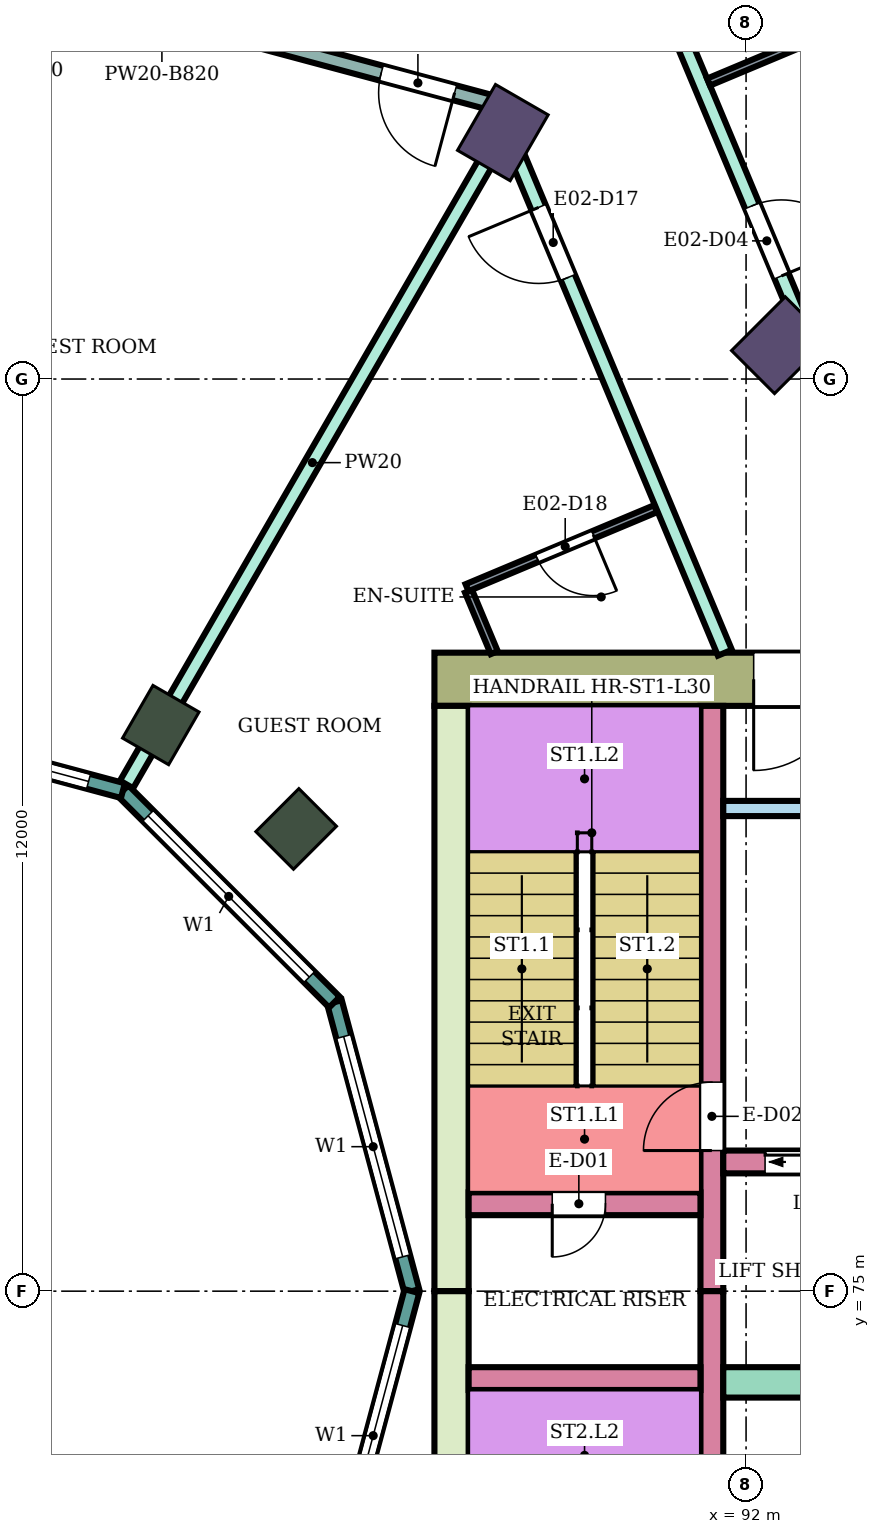
"""IFC4 building model, lengths in metres.
Left out: names, types, materials, properties, quantities, classifications, styles, units other than length and angle.
Written with IfcOpenShell. Run it as: python <this file> out.ifc"""

import sys

from ifc_helpers import new_model, si_unit, direction, frame, frame_2d, origin, origin_2d, place, context, subcontext, project, spatial, rectangle, extrude, element, fill, save


model = new_model("IFC4")
c1 = context("Model", 3, precision=1e-05, world=origin(), true_north=direction((0.0, 1.0)))
c2 = subcontext(c1, "Body", "Model", "MODEL_VIEW")
j1 = project(units=[si_unit("LENGTHUNIT", "METRE"), si_unit("PLANEANGLEUNIT", "RADIAN")], contexts=[c1])
p1 = place(None, origin())
s1 = spatial("IfcSite", under=j1, at=p1, CompositionType="ELEMENT")
p2 = place(p1, origin())
s2 = spatial("IfcBuilding", under=s1, at=p2, CompositionType="ELEMENT")
p3 = place(p2, frame((0.0, 0.0, 130.2)))
s3 = spatial("IfcBuildingStorey", under=s2, at=p3, CompositionType="ELEMENT", Elevation=130.2)
for number, where, z_axis, x_axis in (
    (1, (92.445, 87.445, 0.0), (0.0, 0.0, 1.0), (0.707, 0.707, 0.0)),
    (2, (88.8, 90.242, 0.0), (0.0, 0.0, 1.0), (0.5, 0.866, 0.0)),
):
    element("IfcColumn", number, at=place(p3, frame(where, z_axis=z_axis, x_axis=x_axis)), inside=s3, PredefinedType="COLUMN", context=c2, shape_type="SweptSolid", body=[
        extrude(rectangle(XDim=1.0, YDim=0.8, at=origin_2d()), origin(), (0.0, 0.0, 1.0), 3.9),
    ])
for number, where, z_axis, x_axis in (
    (3, (86.081, 81.081, 0.0), (0.0, 0.0, 1.0), (0.707, 0.707, 0.0)),
    (4, (84.3, 82.448, 0.0), (0.0, 0.0, 1.0), (0.5, 0.866, 0.0)),
):
    element("IfcColumn", number, at=place(p3, frame(where, z_axis=z_axis, x_axis=x_axis)), inside=s3, PredefinedType="COLUMN", context=c2, shape_type="SweptSolid", body=[
        extrude(rectangle(XDim=0.8, YDim=0.7, at=origin_2d()), origin(), (0.0, 0.0, 1.0), 3.9),
    ])
p4 = place(p3, frame((87.9, 83.05, 0.0), z_axis=(0.0, 0.0, 1.0), x_axis=(1.0, 0.0, 0.0)))
e5 = element("IfcWall", 5, at=p4, inside=s3, PredefinedType="SHEAR", context=c2, shape_type="SweptSolid", body=[
    extrude(rectangle(XDim=14.8, YDim=0.7, at=frame_2d((7.4, 0.0))), origin(), (0.0, 0.0, 1.0), 3.58),
])
p5 = place(p4, frame((4.2, 0.0, 0.0)))
e6 = element("IfcOpeningElement", 6, at=p5, cuts=e5, PredefinedType="OPENING", context=c2, shape_type="SweptSolid", body=[
    extrude(rectangle(XDim=2.4, YDim=2.4, at=frame_2d((1.2, 1.2))), frame((0.0, 0.36, 0.0), z_axis=(0.0, -1.0, 0.0), x_axis=(1.0, 0.0, 0.0)), (0.0, 0.0, 1.0), 0.72),
])
for number, where, z_axis, x_axis in (
    (7, (88.125, 75.0, 0.0), (0.0, 0.0, 1.0), (0.0, 1.0, 0.0)),
    (8, (88.125, 67.3, 0.0), (0.0, 0.0, 1.0), (0.0, 1.0, 0.0)),
):
    element("IfcWall", number, at=place(p3, frame(where, z_axis=z_axis, x_axis=x_axis)), inside=s3, PredefinedType="SHEAR", context=c2, shape_type="SweptSolid", body=[
        extrude(rectangle(XDim=7.7, YDim=0.45, at=frame_2d((3.85, 0.0))), origin(), (0.0, 0.0, 1.0), 3.58),
    ])
p6 = place(p3, frame((91.55, 75.0, 0.0), z_axis=(0.0, 0.0, 1.0), x_axis=(0.0, 1.0, 0.0)))
e9 = element("IfcWall", 9, at=p6, inside=s3, PredefinedType="SHEAR", context=c2, shape_type="SweptSolid", body=[
    extrude(rectangle(XDim=7.7, YDim=0.3, at=frame_2d((3.85, 0.0))), origin(), (0.0, 0.0, 1.0), 3.58),
])
p7 = place(p6, frame((1.85, 0.0, 0.0)))
e10 = element("IfcOpeningElement", 10, at=p7, cuts=e9, PredefinedType="OPENING", context=c2, shape_type="SweptSolid", body=[
    extrude(rectangle(XDim=0.9, YDim=2.1, at=frame_2d((0.45, 1.05))), frame((0.0, 0.16, 0.0), z_axis=(0.0, -1.0, 0.0), x_axis=(1.0, 0.0, 0.0)), (0.0, 0.0, 1.0), 0.32),
])
p8 = place(p3, frame((91.55, 67.3, 0.0), z_axis=(0.0, 0.0, 1.0), x_axis=(0.0, 1.0, 0.0)))
e11 = element("IfcWall", 11, at=p8, inside=s3, PredefinedType="SHEAR", context=c2, shape_type="SweptSolid", body=[
    extrude(rectangle(XDim=7.7, YDim=0.3, at=frame_2d((3.85, 0.0))), origin(), (0.0, 0.0, 1.0), 3.58),
])
p9 = place(p8, frame((0.35, 0.0, 0.0)))
e12 = element("IfcOpeningElement", 12, at=p9, cuts=e11, PredefinedType="OPENING", context=c2, shape_type="SweptSolid", body=[
    extrude(rectangle(XDim=0.9, YDim=2.1, at=frame_2d((0.45, 1.05))), frame((0.0, 0.16, 0.0), z_axis=(0.0, -1.0, 0.0), x_axis=(1.0, 0.0, 0.0)), (0.0, 0.0, 1.0), 0.32),
])
p10 = place(p3, frame((88.35, 76.15, 0.0), z_axis=(0.0, 0.0, 1.0), x_axis=(1.0, 0.0, 0.0)))
e13 = element("IfcWall", 13, at=p10, inside=s3, PredefinedType="SHEAR", context=c2, shape_type="SweptSolid", body=[
    extrude(rectangle(XDim=3.05, YDim=0.3, at=frame_2d((1.525, 0.0))), origin(), (0.0, 0.0, 1.0), 3.58),
])
p11 = place(p10, frame((1.1, 0.0, 0.0)))
e14 = element("IfcOpeningElement", 14, at=p11, cuts=e13, PredefinedType="OPENING", context=c2, shape_type="SweptSolid", body=[
    extrude(rectangle(XDim=0.7, YDim=2.0, at=frame_2d((0.35, 1.0))), frame((0.0, 0.16, 0.0), z_axis=(0.0, -1.0, 0.0), x_axis=(1.0, 0.0, 0.0)), (0.0, 0.0, 1.0), 0.32),
])
p12 = place(p3, frame((88.35, 73.85, 0.0), z_axis=(0.0, 0.0, 1.0), x_axis=(1.0, 0.0, 0.0)))
e15 = element("IfcWall", 15, at=p12, inside=s3, PredefinedType="SHEAR", context=c2, shape_type="SweptSolid", body=[
    extrude(rectangle(XDim=3.05, YDim=0.3, at=frame_2d((1.525, 0.0))), origin(), (0.0, 0.0, 1.0), 3.58),
])
p13 = place(p3, frame((91.7, 76.7, 0.0), z_axis=(0.0, 0.0, 1.0), x_axis=(1.0, 0.0, 0.0)))
e16 = element("IfcWall", 16, at=p13, inside=s3, PredefinedType="SHEAR", context=c2, shape_type="SweptSolid", body=[
    extrude(rectangle(XDim=11.0, YDim=0.3, at=frame_2d((5.5, 0.0))), origin(), (0.0, 0.0, 1.0), 3.58),
])
p14 = place(p13, frame((0.55, 0.0, 0.0)))
e17 = element("IfcOpeningElement", 17, at=p14, cuts=e16, PredefinedType="OPENING", context=c2, shape_type="SweptSolid", body=[
    extrude(rectangle(XDim=1.1, YDim=2.1, at=frame_2d((0.55, 1.05))), frame((0.0, 0.16, 0.0), z_axis=(0.0, -1.0, 0.0), x_axis=(1.0, 0.0, 0.0)), (0.0, 0.0, 1.0), 0.32),
])
p15 = place(p13, frame((8.1, 0.0, 0.0)))
e18 = element("IfcOpeningElement", 18, at=p15, cuts=e16, PredefinedType="OPENING", context=c2, shape_type="SweptSolid", body=[
    extrude(rectangle(XDim=1.0, YDim=2.1, at=frame_2d((0.5, 1.05))), frame((0.0, 0.16, 0.0), z_axis=(0.0, -1.0, 0.0), x_axis=(1.0, 0.0, 0.0)), (0.0, 0.0, 1.0), 0.32),
])
p16 = place(p3, frame((91.7, 73.8, 0.0), z_axis=(0.0, 0.0, 1.0), x_axis=(1.0, 0.0, 0.0)))
e19 = element("IfcWall", 19, at=p16, inside=s3, PredefinedType="SHEAR", context=c2, shape_type="SweptSolid", body=[
    extrude(rectangle(XDim=11.0, YDim=0.4, at=frame_2d((5.5, 0.0))), origin(), (0.0, 0.0, 1.0), 3.58),
])
p17 = place(p3, frame((91.7, 81.35, 0.0), z_axis=(0.0, 0.0, 1.0), x_axis=(1.0, 0.0, 0.0)))
e20 = element("IfcWall", 20, at=p17, inside=s3, PredefinedType="SHEAR", context=c2, shape_type="SweptSolid", body=[
    extrude(rectangle(XDim=4.5, YDim=0.2, at=frame_2d((2.25, 0.0))), origin(), (0.0, 0.0, 1.0), 3.58),
])
p18 = place(p3, frame((87.604, 75.0, 0.0), z_axis=(0.0, 0.0, 1.0), x_axis=(-0.258789828301, 0.965933654434, 0.0)))
e21 = element("IfcWall", 21, at=p18, inside=s3, PredefinedType="NOTDEFINED", context=c2, shape_type="SweptSolid", body=[
    extrude(rectangle(XDim=3.936, YDim=0.2, at=frame_2d((1.968, 0.0))), origin(), (0.0, 0.0, 1.0), 3.9),
])
p19 = place(p18, frame((0.468, 0.0, 0.9)))
e22 = element("IfcOpeningElement", 22, at=p19, cuts=e21, PredefinedType="OPENING", context=c2, shape_type="SweptSolid", body=[
    extrude(rectangle(XDim=3.0, YDim=2.3, at=frame_2d((1.5, 1.15))), frame((0.0, 0.11, 0.0), z_axis=(0.0, -1.0, 0.0), x_axis=(1.0, 0.0, 0.0)), (0.0, 0.0, 1.0), 0.22),
])
p20 = place(p3, frame((86.585, 78.802, 0.0), z_axis=(0.0, 0.0, 1.0), x_axis=(-0.707106781187, 0.707106781187, 0.0)))
e23 = element("IfcWall", 23, at=p20, inside=s3, PredefinedType="NOTDEFINED", context=c2, shape_type="SweptSolid", body=[
    extrude(rectangle(XDim=3.936, YDim=0.2, at=frame_2d((1.968, 0.0))), origin(), (0.0, 0.0, 1.0), 3.9),
])
p21 = place(p20, frame((0.468, 0.0, 0.9)))
e24 = element("IfcOpeningElement", 24, at=p21, cuts=e23, PredefinedType="OPENING", context=c2, shape_type="SweptSolid", body=[
    extrude(rectangle(XDim=3.0, YDim=2.3, at=frame_2d((1.5, 1.15))), frame((0.0, 0.11, 0.0), z_axis=(0.0, -1.0, 0.0), x_axis=(1.0, 0.0, 0.0)), (0.0, 0.0, 1.0), 0.22),
])
p22 = place(p3, frame((83.802, 81.585, 0.0), z_axis=(0.0, 0.0, 1.0), x_axis=(-0.965933654434, 0.258789828301, 0.0)))
e25 = element("IfcWall", 25, at=p22, inside=s3, PredefinedType="NOTDEFINED", context=c2, shape_type="SweptSolid", body=[
    extrude(rectangle(XDim=3.936, YDim=0.2, at=frame_2d((1.968, 0.0))), origin(), (0.0, 0.0, 1.0), 3.9),
])
p23 = place(p22, frame((0.468, 0.0, 0.9)))
e26 = element("IfcOpeningElement", 26, at=p23, cuts=e25, PredefinedType="OPENING", context=c2, shape_type="SweptSolid", body=[
    extrude(rectangle(XDim=3.0, YDim=2.3, at=frame_2d((1.5, 1.15))), frame((0.0, 0.11, 0.0), z_axis=(0.0, -1.0, 0.0), x_axis=(1.0, 0.0, 0.0)), (0.0, 0.0, 1.0), 0.22),
])
p24 = place(p3, frame((86.585, 71.198, 0.0), z_axis=(0.0, 0.0, 1.0), x_axis=(0.258789828301, 0.965933654434, 0.0)))
e27 = element("IfcWall", 27, at=p24, inside=s3, PredefinedType="NOTDEFINED", context=c2, shape_type="SweptSolid", body=[
    extrude(rectangle(XDim=3.936, YDim=0.2, at=frame_2d((1.968, 0.0))), origin(), (0.0, 0.0, 1.0), 3.9),
])
p25 = place(p24, frame((0.468, 0.0, 0.9)))
e28 = element("IfcOpeningElement", 28, at=p25, cuts=e27, PredefinedType="OPENING", context=c2, shape_type="SweptSolid", body=[
    extrude(rectangle(XDim=3.0, YDim=2.3, at=frame_2d((1.5, 1.15))), frame((0.0, 0.11, 0.0), z_axis=(0.0, -1.0, 0.0), x_axis=(1.0, 0.0, 0.0)), (0.0, 0.0, 1.0), 0.22),
])
p26 = place(p3, frame((80.0, 92.954, 0.0), z_axis=(0.0, 0.0, 1.0), x_axis=(0.96592536278, -0.258820774936, 0.0)))
e29 = element("IfcWall", 29, at=p26, inside=s3, PredefinedType="PARTITIONING", context=c2, shape_type="SweptSolid", body=[
    extrude(rectangle(XDim=8.934, YDim=0.2, at=frame_2d((4.467, 0.0))), origin(), (0.0, 0.0, 1.0), 3.08),
])
p27 = place(p26, frame((7.454, 0.0, 0.0)))
e30 = element("IfcOpeningElement", 30, at=p27, cuts=e29, PredefinedType="OPENING", context=c2, shape_type="SweptSolid", body=[
    extrude(rectangle(XDim=1.0, YDim=2.1, at=frame_2d((0.5, 1.05))), frame((0.0, 0.11, 0.0), z_axis=(0.0, -1.0, 0.0), x_axis=(1.0, 0.0, 0.0)), (0.0, 0.0, 1.0), 0.22),
])
p28 = place(p3, frame((83.85, 81.667, 0.0), z_axis=(0.0, 0.0, 1.0), x_axis=(0.500092047414, 0.865972253663, 0.0)))
e31 = element("IfcWall", 31, at=p28, inside=s3, PredefinedType="PARTITIONING", context=c2, shape_type="SweptSolid", body=[
    extrude(rectangle(XDim=9.778, YDim=0.2, at=frame_2d((4.889, 0.0))), origin(), (0.0, 0.0, 1.0), 3.45),
])
p29 = place(p3, frame((88.698, 90.624, 0.0), z_axis=(0.0, 0.0, 1.0), x_axis=(0.386027055918, -0.922487459047, 0.0)))
e32 = element("IfcWall", 32, at=p29, inside=s3, PredefinedType="PARTITIONING", context=c2, shape_type="SweptSolid", body=[
    extrude(rectangle(XDim=7.832, YDim=0.2, at=frame_2d((3.916, 0.0))), origin(), (0.0, 0.0, 1.0), 3.45),
])
p30 = place(p29, frame((1.482, 0.0, 0.0)))
e33 = element("IfcOpeningElement", 33, at=p30, cuts=e32, PredefinedType="OPENING", context=c2, shape_type="SweptSolid", body=[
    extrude(rectangle(XDim=1.0, YDim=2.1, at=frame_2d((0.5, 1.05))), frame((0.0, 0.11, 0.0), z_axis=(0.0, -1.0, 0.0), x_axis=(1.0, 0.0, 0.0)), (0.0, 0.0, 1.0), 0.22),
])
p31 = place(p3, frame((90.604, 92.805, 0.0), z_axis=(0.0, 0.0, 1.0), x_axis=(0.386199042801, -0.922415470024, 0.0)))
e34 = element("IfcWall", 34, at=p31, inside=s3, PredefinedType="PARTITIONING", context=c2, shape_type="SweptSolid", body=[
    extrude(rectangle(XDim=8.48, YDim=0.2, at=frame_2d((4.24, 0.0))), origin(), (0.0, 0.0, 1.0), 3.45),
])
p32 = place(p31, frame((3.823, 0.0, 0.0)))
e35 = element("IfcOpeningElement", 35, at=p32, cuts=e34, PredefinedType="OPENING", context=c2, shape_type="SweptSolid", body=[
    extrude(rectangle(XDim=1.0, YDim=2.1, at=frame_2d((0.5, 1.05))), frame((0.0, 0.11, 0.0), z_axis=(0.0, -1.0, 0.0), x_axis=(1.0, 0.0, 0.0)), (0.0, 0.0, 1.0), 0.22),
])
p33 = place(p3, frame((88.348, 84.209, 0.0), z_axis=(0.0, 0.0, 1.0), x_axis=(0.386077497504, -0.922466349479, 0.0)))
e36 = element("IfcWall", 36, at=p33, inside=s3, PredefinedType="PARTITIONING", context=c2, shape_type="SweptSolid", body=[
    extrude(rectangle(XDim=0.877, YDim=0.1, at=frame_2d((0.438, 0.0))), origin(), (0.0, 0.0, 1.0), 3.45),
])
p34 = place(p3, frame((88.329, 84.255, 0.0), z_axis=(0.0, 0.0, 1.0), x_axis=(0.922320663728, 0.386425404522, 0.0)))
e37 = element("IfcWall", 37, at=p34, inside=s3, PredefinedType="PARTITIONING", context=c2, shape_type="SweptSolid", body=[
    extrude(rectangle(XDim=2.69, YDim=0.1, at=frame_2d((1.345, 0.0))), origin(), (0.0, 0.0, 1.0), 3.45),
])
p35 = place(p34, frame((1.0, 0.0, 0.0)))
e38 = element("IfcOpeningElement", 38, at=p35, cuts=e37, PredefinedType="OPENING", context=c2, shape_type="SweptSolid", body=[
    extrude(rectangle(XDim=0.8, YDim=2.1, at=frame_2d((0.4, 1.05))), frame((0.0, 0.06, 0.0), z_axis=(0.0, -1.0, 0.0), x_axis=(1.0, 0.0, 0.0)), (0.0, 0.0, 1.0), 0.12),
])
p36 = place(p3, frame((91.507, 90.907, 0.0), z_axis=(0.0, 0.0, 1.0), x_axis=(0.922344808264, 0.38636777126, 0.0)))
e39 = element("IfcWall", 39, at=p36, inside=s3, PredefinedType="PARTITIONING", context=c2, shape_type="SweptSolid", body=[
    extrude(rectangle(XDim=2.65, YDim=0.1, at=frame_2d((1.325, 0.0))), origin(), (0.0, 0.0, 1.0), 3.45),
])
p37 = place(p19, origin())
e40 = element("IfcWindow", 40, at=p37, inside=s3, PartitioningType="SINGLE_PANEL", PredefinedType="WINDOW", context=c2, shape_type="SweptSolid", body=[
    extrude(rectangle(XDim=3.0, YDim=2.3, at=frame_2d((1.5, 1.15))), frame((0.0, 0.03, 0.0), z_axis=(0.0, -1.0, 0.0), x_axis=(1.0, 0.0, 0.0)), (0.0, 0.0, 1.0), 0.06),
])
fill(e22, e40)
p38 = place(p21, origin())
e41 = element("IfcWindow", 41, at=p38, inside=s3, PartitioningType="SINGLE_PANEL", PredefinedType="WINDOW", context=c2, shape_type="SweptSolid", body=[
    extrude(rectangle(XDim=3.0, YDim=2.3, at=frame_2d((1.5, 1.15))), frame((0.0, 0.03, 0.0), z_axis=(0.0, -1.0, 0.0), x_axis=(1.0, 0.0, 0.0)), (0.0, 0.0, 1.0), 0.06),
])
fill(e24, e41)
p39 = place(p23, origin())
e42 = element("IfcWindow", 42, at=p39, inside=s3, PartitioningType="SINGLE_PANEL", PredefinedType="WINDOW", context=c2, shape_type="SweptSolid", body=[
    extrude(rectangle(XDim=3.0, YDim=2.3, at=frame_2d((1.5, 1.15))), frame((0.0, 0.03, 0.0), z_axis=(0.0, -1.0, 0.0), x_axis=(1.0, 0.0, 0.0)), (0.0, 0.0, 1.0), 0.06),
])
fill(e26, e42)
p40 = place(p25, origin())
e43 = element("IfcWindow", 43, at=p40, inside=s3, PartitioningType="SINGLE_PANEL", PredefinedType="WINDOW", context=c2, shape_type="SweptSolid", body=[
    extrude(rectangle(XDim=3.0, YDim=2.3, at=frame_2d((1.5, 1.15))), frame((0.0, 0.03, 0.0), z_axis=(0.0, -1.0, 0.0), x_axis=(1.0, 0.0, 0.0)), (0.0, 0.0, 1.0), 0.06),
])
fill(e28, e43)
p41 = place(p32, origin())
e44 = element("IfcDoor", 44, at=p41, inside=s3, OperationType="SINGLE_SWING_RIGHT", PredefinedType="DOOR", context=c2, shape_type="SweptSolid", body=[
    extrude(rectangle(XDim=1.0, YDim=2.1, at=frame_2d((0.5, 1.05))), frame((0.0, 0.025, 0.0), z_axis=(0.0, -1.0, 0.0), x_axis=(1.0, 0.0, 0.0)), (0.0, 0.0, 1.0), 0.05),
])
fill(e35, e44)
p42 = place(p30, frame((1.0, 0.0, 0.0), z_axis=(0.0, 0.0, 1.0), x_axis=(-1.0, 0.0, 0.0)))
e45 = element("IfcDoor", 45, at=p42, inside=s3, OperationType="SINGLE_SWING_RIGHT", PredefinedType="DOOR", context=c2, shape_type="SweptSolid", body=[
    extrude(rectangle(XDim=1.0, YDim=2.1, at=frame_2d((0.5, 1.05))), frame((0.0, 0.025, 0.0), z_axis=(0.0, -1.0, 0.0), x_axis=(1.0, 0.0, 0.0)), (0.0, 0.0, 1.0), 0.05),
])
fill(e33, e45)
p43 = place(p35, frame((0.8, 0.0, 0.0), z_axis=(0.0, 0.0, 1.0), x_axis=(-1.0, 0.0, 0.0)))
e46 = element("IfcDoor", 46, at=p43, inside=s3, OperationType="SINGLE_SWING_LEFT", PredefinedType="DOOR", context=c2, shape_type="SweptSolid", body=[
    extrude(rectangle(XDim=0.8, YDim=2.1, at=frame_2d((0.4, 1.05))), frame((0.0, 0.025, 0.0), z_axis=(0.0, -1.0, 0.0), x_axis=(1.0, 0.0, 0.0)), (0.0, 0.0, 1.0), 0.05),
])
fill(e38, e46)
p44 = place(p27, frame((1.0, 0.0, 0.0), z_axis=(0.0, 0.0, 1.0), x_axis=(-1.0, 0.0, 0.0)))
e47 = element("IfcDoor", 47, at=p44, inside=s3, OperationType="SINGLE_SWING_LEFT", PredefinedType="DOOR", context=c2, shape_type="SweptSolid", body=[
    extrude(rectangle(XDim=1.0, YDim=2.1, at=frame_2d((0.5, 1.05))), frame((0.0, 0.025, 0.0), z_axis=(0.0, -1.0, 0.0), x_axis=(1.0, 0.0, 0.0)), (0.0, 0.0, 1.0), 0.05),
])
fill(e30, e47)
p45 = place(p11, frame((0.7, 0.0, 0.0), z_axis=(0.0, 0.0, 1.0), x_axis=(-1.0, 0.0, 0.0)))
e48 = element("IfcDoor", 48, at=p45, inside=s3, OperationType="SINGLE_SWING_RIGHT", PredefinedType="DOOR", context=c2, shape_type="SweptSolid", body=[
    extrude(rectangle(XDim=0.7, YDim=2.0, at=frame_2d((0.35, 1.0))), frame((0.0, 0.025, 0.0), z_axis=(0.0, -1.0, 0.0), x_axis=(1.0, 0.0, 0.0)), (0.0, 0.0, 1.0), 0.05),
])
fill(e14, e48)
p46 = place(p7, origin())
e49 = element("IfcDoor", 49, at=p46, inside=s3, OperationType="SINGLE_SWING_LEFT", PredefinedType="DOOR", context=c2, shape_type="SweptSolid", body=[
    extrude(rectangle(XDim=0.9, YDim=2.1, at=frame_2d((0.45, 1.05))), frame((0.0, 0.025, 0.0), z_axis=(0.0, -1.0, 0.0), x_axis=(1.0, 0.0, 0.0)), (0.0, 0.0, 1.0), 0.05),
])
fill(e10, e49)
p47 = place(p14, origin())
e50 = element("IfcDoor", 50, at=p47, inside=s3, OperationType="DOUBLE_DOOR_SLIDING", PredefinedType="DOOR", context=c2, shape_type="SweptSolid", body=[
    extrude(rectangle(XDim=1.1, YDim=2.1, at=frame_2d((0.55, 1.05))), frame((0.0, 0.025, 0.0), z_axis=(0.0, -1.0, 0.0), x_axis=(1.0, 0.0, 0.0)), (0.0, 0.0, 1.0), 0.05),
])
fill(e17, e50)
p48 = place(p5, frame((2.4, 0.0, 0.0), z_axis=(0.0, 0.0, 1.0), x_axis=(-1.0, 0.0, 0.0)))
e51 = element("IfcDoor", 51, at=p48, inside=s3, OperationType="DOUBLE_DOOR_SINGLE_SWING", PredefinedType="DOOR", context=c2, shape_type="SweptSolid", body=[
    extrude(rectangle(XDim=2.4, YDim=2.4, at=frame_2d((1.2, 1.2))), frame((0.0, 0.025, 0.0), z_axis=(0.0, -1.0, 0.0), x_axis=(1.0, 0.0, 0.0)), (0.0, 0.0, 1.0), 0.05),
])
fill(e6, e51)
save(model, sys.argv[1])
